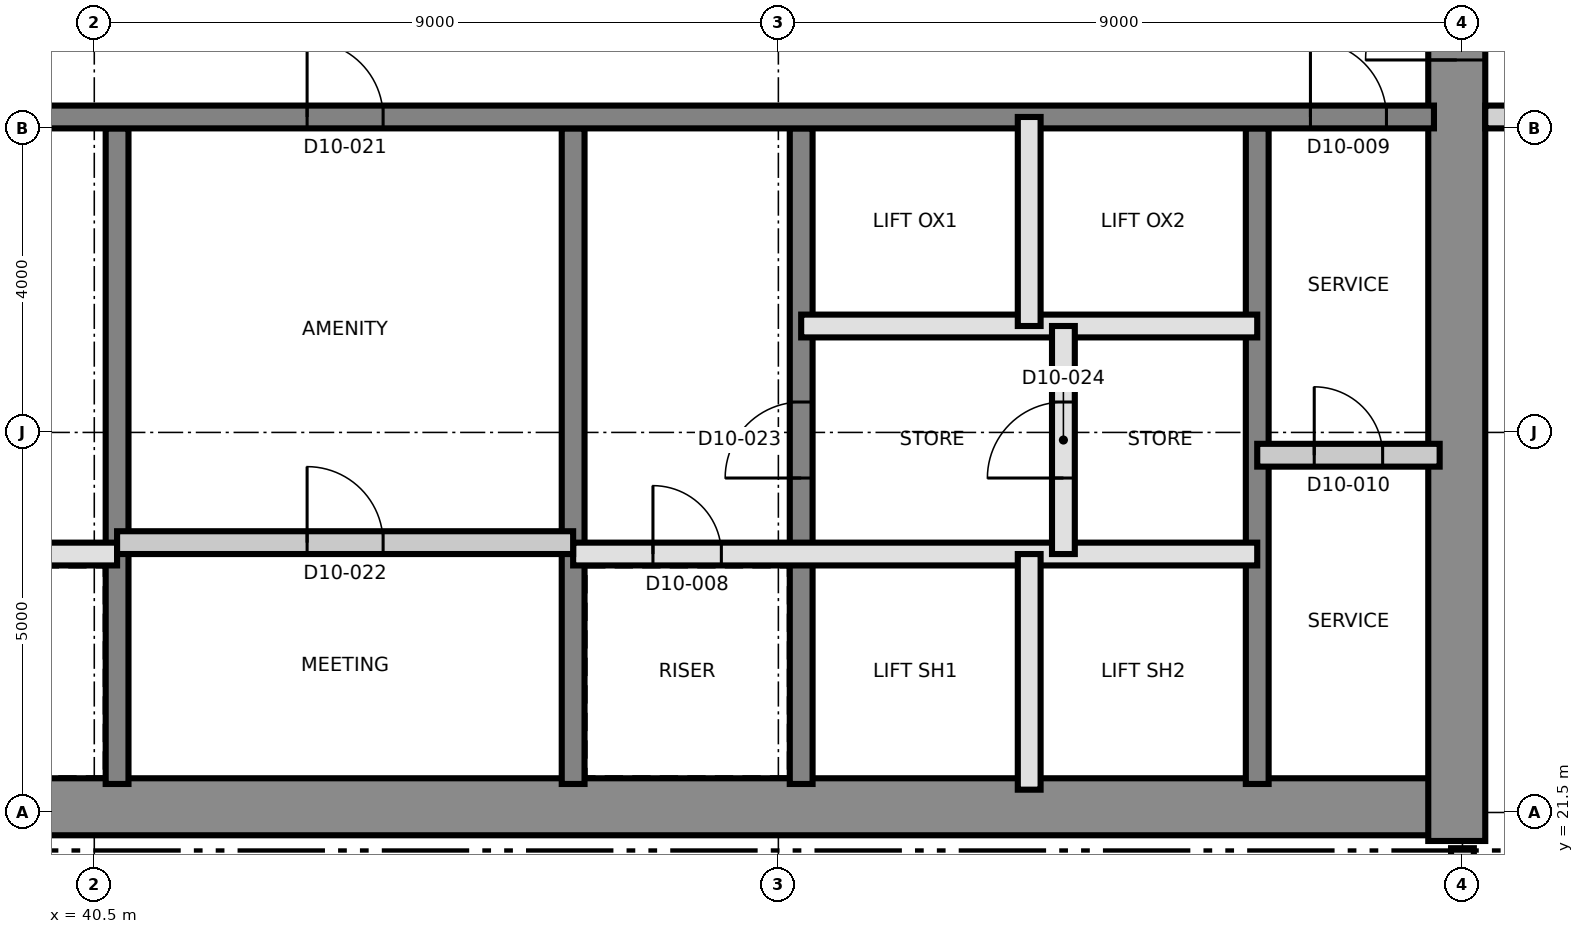
"""IFC4 building model, lengths in metres.
Left out: names, types, materials, properties, quantities, classifications, styles, units other than length and angle.
Written with IfcOpenShell. Run it as: python <this file> out.ifc"""

import sys

from ifc_helpers import new_model, si_unit, direction, frame, frame_2d, origin, place, context, subcontext, project, spatial, rectangle, extrude, element, fill, save


model = new_model("IFC4")
c1 = context("Model", 3, precision=1e-05, world=origin(), true_north=direction((0.0, 1.0)))
c2 = subcontext(c1, "Body", "Model", "MODEL_VIEW")
j1 = project(units=[si_unit("LENGTHUNIT", "METRE"), si_unit("PLANEANGLEUNIT", "RADIAN")], contexts=[c1])
p1 = place(None, origin())
s1 = spatial("IfcSite", under=j1, at=p1, CompositionType="ELEMENT")
p2 = place(p1, origin())
s2 = spatial("IfcBuilding", under=s1, at=p2, CompositionType="ELEMENT")
p3 = place(p2, frame((0.0, 0.0, 120.4)))
s3 = spatial("IfcBuildingStorey", under=s2, at=p3, CompositionType="ELEMENT", Elevation=120.4)
p4 = place(p3, frame((31.125, 21.575, 0.0), z_axis=(0.0, 0.0, 1.0), x_axis=(1.0, 0.0, 0.0)))
e1 = element("IfcWall", 1, at=p4, inside=s3, PredefinedType="SHEAR", context=c2, shape_type="SweptSolid", body=[
    extrude(rectangle(XDim=27.0, YDim=0.75, at=frame_2d((13.5, 0.0))), origin(), (0.0, 0.0, 1.0), 3.7),
])
p5 = place(p3, frame((58.425, 21.125, 0.0), z_axis=(0.0, 0.0, 1.0), x_axis=(0.0, 1.0, 0.0)))
e2 = element("IfcWall", 2, at=p5, inside=s3, PredefinedType="SHEAR", context=c2, shape_type="SweptSolid", body=[
    extrude(rectangle(XDim=18.75, YDim=0.75, at=frame_2d((9.375, 0.0))), origin(), (0.0, 0.0, 1.0), 3.7),
])
p6 = place(p5, frame((10.275, 0.0, 0.0)))
e3 = element("IfcOpeningElement", 3, at=p6, cuts=e2, PredefinedType="OPENING", context=c2, shape_type="SweptSolid", body=[
    extrude(rectangle(XDim=1.2, YDim=2.1, at=frame_2d((0.6, 1.05))), frame((0.0, 0.385, 0.0), z_axis=(0.0, -1.0, 0.0), x_axis=(1.0, 0.0, 0.0)), (0.0, 0.0, 1.0), 0.77),
])
for number, where, z_axis, x_axis in (
    (4, (40.8, 21.875, 0.0), (0.0, 0.0, 1.0), (0.0, 1.0, 0.0)),
    (5, (46.8, 21.875, 0.0), (0.0, 0.0, 1.0), (0.0, 1.0, 0.0)),
):
    element("IfcWall", number, at=place(p3, frame(where, z_axis=z_axis, x_axis=x_axis)), inside=s3, PredefinedType="SHEAR", context=c2, shape_type="SweptSolid", body=[
        extrude(rectangle(XDim=8.625, YDim=0.3, at=frame_2d((4.312, 0.0))), origin(), (0.0, 0.0, 1.0), 3.7),
    ])
p7 = place(p3, frame((49.8, 21.875, 0.0), z_axis=(0.0, 0.0, 1.0), x_axis=(0.0, 1.0, 0.0)))
e6 = element("IfcWall", 6, at=p7, inside=s3, PredefinedType="SHEAR", context=c2, shape_type="SweptSolid", body=[
    extrude(rectangle(XDim=8.625, YDim=0.3, at=frame_2d((4.312, 0.0))), origin(), (0.0, 0.0, 1.0), 3.7),
])
p8 = place(p7, frame((4.025, 0.0, 0.0)))
e7 = element("IfcOpeningElement", 7, at=p8, cuts=e6, PredefinedType="OPENING", context=c2, shape_type="SweptSolid", body=[
    extrude(rectangle(XDim=1.0, YDim=2.1, at=frame_2d((0.5, 1.05))), frame((0.0, 0.16, 0.0), z_axis=(0.0, -1.0, 0.0), x_axis=(1.0, 0.0, 0.0)), (0.0, 0.0, 1.0), 0.32),
])
p9 = place(p3, frame((55.8, 21.875, 0.0), z_axis=(0.0, 0.0, 1.0), x_axis=(0.0, 1.0, 0.0)))
e8 = element("IfcWall", 8, at=p9, inside=s3, PredefinedType="SHEAR", context=c2, shape_type="SweptSolid", body=[
    extrude(rectangle(XDim=8.625, YDim=0.3, at=frame_2d((4.312, 0.0))), origin(), (0.0, 0.0, 1.0), 3.7),
])
p10 = place(p3, frame((31.875, 30.65, 0.0), z_axis=(0.0, 0.0, 1.0), x_axis=(1.0, 0.0, 0.0)))
e9 = element("IfcWall", 9, at=p10, inside=s3, PredefinedType="SHEAR", context=c2, shape_type="SweptSolid", body=[
    extrude(rectangle(XDim=26.25, YDim=0.3, at=frame_2d((13.125, 0.0))), origin(), (0.0, 0.0, 1.0), 3.7),
])
p11 = place(p10, frame((24.625, 0.0, 0.0)))
e10 = element("IfcOpeningElement", 10, at=p11, cuts=e9, PredefinedType="OPENING", context=c2, shape_type="SweptSolid", body=[
    extrude(rectangle(XDim=1.0, YDim=2.1, at=frame_2d((0.5, 1.05))), frame((0.0, 0.16, 0.0), z_axis=(0.0, -1.0, 0.0), x_axis=(1.0, 0.0, 0.0)), (0.0, 0.0, 1.0), 0.32),
])
p12 = place(p10, frame((11.425, 0.0, 0.0)))
e11 = element("IfcOpeningElement", 11, at=p12, cuts=e9, PredefinedType="OPENING", context=c2, shape_type="SweptSolid", body=[
    extrude(rectangle(XDim=1.0, YDim=2.1, at=frame_2d((0.5, 1.05))), frame((0.0, 0.16, 0.0), z_axis=(0.0, -1.0, 0.0), x_axis=(1.0, 0.0, 0.0)), (0.0, 0.0, 1.0), 0.32),
])
p13 = place(p3, frame((31.8, 24.9, 0.0), z_axis=(0.0, 0.0, 1.0), x_axis=(1.0, 0.0, 0.0)))
e12 = element("IfcWall", 12, at=p13, inside=s3, PredefinedType="SOLIDWALL", context=c2, shape_type="SweptSolid", body=[
    extrude(rectangle(XDim=9.0, YDim=0.3, at=frame_2d((4.5, 0.0))), origin(), (0.0, 0.0, 1.0), 3.4),
])
p14 = place(p13, frame((7.05, 0.0, 0.0)))
e13 = element("IfcOpeningElement", 13, at=p14, cuts=e12, PredefinedType="OPENING", context=c2, shape_type="SweptSolid", body=[
    extrude(rectangle(XDim=0.9, YDim=2.1, at=frame_2d((0.45, 1.05))), frame((0.0, 0.16, 0.0), z_axis=(0.0, -1.0, 0.0), x_axis=(1.0, 0.0, 0.0)), (0.0, 0.0, 1.0), 0.32),
])
p15 = place(p13, frame((0.95, 0.0, 0.0)))
e14 = element("IfcOpeningElement", 14, at=p15, cuts=e12, PredefinedType="OPENING", context=c2, shape_type="SweptSolid", body=[
    extrude(rectangle(XDim=1.1, YDim=2.4, at=frame_2d((0.55, 1.2))), frame((0.0, 0.16, 0.0), z_axis=(0.0, -1.0, 0.0), x_axis=(1.0, 0.0, 0.0)), (0.0, 0.0, 1.0), 0.32),
])
p16 = place(p13, frame((3.95, 0.0, 0.0)))
e15 = element("IfcOpeningElement", 15, at=p16, cuts=e12, PredefinedType="OPENING", context=c2, shape_type="SweptSolid", body=[
    extrude(rectangle(XDim=1.1, YDim=2.4, at=frame_2d((0.55, 1.2))), frame((0.0, 0.16, 0.0), z_axis=(0.0, -1.0, 0.0), x_axis=(1.0, 0.0, 0.0)), (0.0, 0.0, 1.0), 0.32),
])
p17 = place(p3, frame((46.8, 24.9, 0.0), z_axis=(0.0, 0.0, 1.0), x_axis=(1.0, 0.0, 0.0)))
e16 = element("IfcWall", 16, at=p17, inside=s3, PredefinedType="SOLIDWALL", context=c2, shape_type="SweptSolid", body=[
    extrude(rectangle(XDim=9.0, YDim=0.3, at=frame_2d((4.5, 0.0))), origin(), (0.0, 0.0, 1.0), 3.4),
])
p18 = place(p17, frame((1.05, 0.0, 0.0)))
e17 = element("IfcOpeningElement", 17, at=p18, cuts=e16, PredefinedType="OPENING", context=c2, shape_type="SweptSolid", body=[
    extrude(rectangle(XDim=0.9, YDim=2.1, at=frame_2d((0.45, 1.05))), frame((0.0, 0.16, 0.0), z_axis=(0.0, -1.0, 0.0), x_axis=(1.0, 0.0, 0.0)), (0.0, 0.0, 1.0), 0.32),
])
p19 = place(p3, frame((40.8, 25.05, 0.0), z_axis=(0.0, 0.0, 1.0), x_axis=(1.0, 0.0, 0.0)))
e18 = element("IfcWall", 18, at=p19, inside=s3, PredefinedType="PARTITIONING", context=c2, shape_type="SweptSolid", body=[
    extrude(rectangle(XDim=6.0, YDim=0.3, at=frame_2d((3.0, 0.0))), origin(), (0.0, 0.0, 1.0), 3.4),
])
p20 = place(p19, frame((2.5, 0.0, 0.0)))
e19 = element("IfcOpeningElement", 19, at=p20, cuts=e18, PredefinedType="OPENING", context=c2, shape_type="SweptSolid", body=[
    extrude(rectangle(XDim=1.0, YDim=2.1, at=frame_2d((0.5, 1.05))), frame((0.0, 0.16, 0.0), z_axis=(0.0, -1.0, 0.0), x_axis=(1.0, 0.0, 0.0)), (0.0, 0.0, 1.0), 0.32),
])
p21 = place(p3, frame((55.8, 26.2, 0.0), z_axis=(0.0, 0.0, 1.0), x_axis=(1.0, 0.0, 0.0)))
e20 = element("IfcWall", 20, at=p21, inside=s3, PredefinedType="PARTITIONING", context=c2, shape_type="SweptSolid", body=[
    extrude(rectangle(XDim=2.4, YDim=0.3, at=frame_2d((1.2, 0.0))), origin(), (0.0, 0.0, 1.0), 3.4),
])
p22 = place(p21, frame((0.75, 0.0, 0.0)))
e21 = element("IfcOpeningElement", 21, at=p22, cuts=e20, PredefinedType="OPENING", context=c2, shape_type="SweptSolid", body=[
    extrude(rectangle(XDim=0.9, YDim=2.1, at=frame_2d((0.45, 1.05))), frame((0.0, 0.16, 0.0), z_axis=(0.0, -1.0, 0.0), x_axis=(1.0, 0.0, 0.0)), (0.0, 0.0, 1.0), 0.32),
])
p23 = place(p3, frame((49.8, 27.9, 0.0), z_axis=(0.0, 0.0, 1.0), x_axis=(1.0, 0.0, 0.0)))
e22 = element("IfcWall", 22, at=p23, inside=s3, PredefinedType="SOLIDWALL", context=c2, shape_type="SweptSolid", body=[
    extrude(rectangle(XDim=6.0, YDim=0.3, at=frame_2d((3.0, 0.0))), origin(), (0.0, 0.0, 1.0), 3.4),
])
p24 = place(p3, frame((52.8, 21.8, 0.0), z_axis=(0.0, 0.0, 1.0), x_axis=(0.0, 1.0, 0.0)))
e23 = element("IfcWall", 23, at=p24, inside=s3, PredefinedType="SOLIDWALL", context=c2, shape_type="SweptSolid", body=[
    extrude(rectangle(XDim=3.1, YDim=0.3, at=frame_2d((1.55, 0.0))), origin(), (0.0, 0.0, 1.0), 3.4),
])
p25 = place(p3, frame((52.8, 27.9, 0.0), z_axis=(0.0, 0.0, 1.0), x_axis=(0.0, 1.0, 0.0)))
e24 = element("IfcWall", 24, at=p25, inside=s3, PredefinedType="SOLIDWALL", context=c2, shape_type="SweptSolid", body=[
    extrude(rectangle(XDim=2.75, YDim=0.3, at=frame_2d((1.375, 0.0))), origin(), (0.0, 0.0, 1.0), 3.4),
])
p26 = place(p3, frame((53.25, 24.9, 0.0), z_axis=(0.0, 0.0, 1.0), x_axis=(0.0, 1.0, 0.0)))
e25 = element("IfcWall", 25, at=p26, inside=s3, PredefinedType="SOLIDWALL", context=c2, shape_type="SweptSolid", body=[
    extrude(rectangle(XDim=3.0, YDim=0.3, at=frame_2d((1.5, 0.0))), origin(), (0.0, 0.0, 1.0), 3.4),
])
p27 = place(p26, frame((1.0, 0.0, 0.0)))
e26 = element("IfcOpeningElement", 26, at=p27, cuts=e25, PredefinedType="OPENING", context=c2, shape_type="SweptSolid", body=[
    extrude(rectangle(XDim=1.0, YDim=2.1, at=frame_2d((0.5, 1.05))), frame((0.0, 0.16, 0.0), z_axis=(0.0, -1.0, 0.0), x_axis=(1.0, 0.0, 0.0)), (0.0, 0.0, 1.0), 0.32),
])
p28 = place(p3, frame((58.8, 30.65, 0.0), z_axis=(0.0, 0.0, 1.0), x_axis=(1.0, 0.0, 0.0)))
e27 = element("IfcWall", 27, at=p28, inside=s3, PredefinedType="PARTITIONING", context=c2, shape_type="SweptSolid", body=[
    extrude(rectangle(XDim=26.53, YDim=0.3, at=frame_2d((13.265, 0.0))), origin(), (0.0, 0.0, 1.0), 3.4),
])
p29 = place(p28, frame((0.835, 0.0, 0.0)))
e28 = element("IfcOpeningElement", 28, at=p29, cuts=e27, PredefinedType="OPENING", context=c2, shape_type="SweptSolid", body=[
    extrude(rectangle(XDim=1.2, YDim=2.1, at=frame_2d((0.6, 1.05))), frame((0.0, 0.16, 0.0), z_axis=(0.0, -1.0, 0.0), x_axis=(1.0, 0.0, 0.0)), (0.0, 0.0, 1.0), 0.32),
])
p30 = place(p28, frame((4.085, 0.0, 0.0)))
e29 = element("IfcOpeningElement", 29, at=p30, cuts=e27, PredefinedType="OPENING", context=c2, shape_type="SweptSolid", body=[
    extrude(rectangle(XDim=1.0, YDim=2.1, at=frame_2d((0.5, 1.05))), frame((0.0, 0.16, 0.0), z_axis=(0.0, -1.0, 0.0), x_axis=(1.0, 0.0, 0.0)), (0.0, 0.0, 1.0), 0.32),
])
p31 = place(p28, frame((12.7, 0.0, 0.0)))
e30 = element("IfcOpeningElement", 30, at=p31, cuts=e27, PredefinedType="OPENING", context=c2, shape_type="SweptSolid", body=[
    extrude(rectangle(XDim=1.0, YDim=2.4, at=frame_2d((0.5, 1.2))), frame((0.0, 0.16, 0.0), z_axis=(0.0, -1.0, 0.0), x_axis=(1.0, 0.0, 0.0)), (0.0, 0.0, 1.0), 0.32),
])
p32 = place(p28, frame((21.7, 0.0, 0.0)))
e31 = element("IfcOpeningElement", 31, at=p32, cuts=e27, PredefinedType="OPENING", context=c2, shape_type="SweptSolid", body=[
    extrude(rectangle(XDim=1.0, YDim=2.4, at=frame_2d((0.5, 1.2))), frame((0.0, 0.16, 0.0), z_axis=(0.0, -1.0, 0.0), x_axis=(1.0, 0.0, 0.0)), (0.0, 0.0, 1.0), 0.32),
])
p33 = place(p3, frame((58.5, 19.275, 0.0), z_axis=(0.0, 0.0, 1.0), x_axis=(0.0, 1.0, 0.0)))
e32 = element("IfcWall", 32, at=p33, inside=s3, PredefinedType="PARTITIONING", context=c2, shape_type="SweptSolid", body=[
    extrude(rectangle(XDim=1.755, YDim=0.3, at=frame_2d((0.877, 0.0))), origin(), (0.0, 0.0, 1.0), 3.35),
])
p34 = place(p18, origin())
e33 = element("IfcDoor", 33, at=p34, inside=s3, OperationType="SINGLE_SWING_RIGHT", PredefinedType="DOOR", context=c2, shape_type="SweptSolid", body=[
    extrude(rectangle(XDim=0.9, YDim=2.1, at=frame_2d((0.45, 1.05))), frame((0.0, 0.025, 0.0), z_axis=(0.0, -1.0, 0.0), x_axis=(1.0, 0.0, 0.0)), (0.0, 0.0, 1.0), 0.05),
])
fill(e17, e33)
p35 = place(p11, origin())
e34 = element("IfcDoor", 34, at=p35, inside=s3, OperationType="SINGLE_SWING_LEFT", PredefinedType="DOOR", context=c2, shape_type="SweptSolid", body=[
    extrude(rectangle(XDim=1.0, YDim=2.1, at=frame_2d((0.5, 1.05))), frame((0.0, 0.025, 0.0), z_axis=(0.0, -1.0, 0.0), x_axis=(1.0, 0.0, 0.0)), (0.0, 0.0, 1.0), 0.05),
])
fill(e10, e34)
p36 = place(p22, origin())
e35 = element("IfcDoor", 35, at=p36, inside=s3, OperationType="SINGLE_SWING_RIGHT", PredefinedType="DOOR", context=c2, shape_type="SweptSolid", body=[
    extrude(rectangle(XDim=0.9, YDim=2.1, at=frame_2d((0.45, 1.05))), frame((0.0, 0.025, 0.0), z_axis=(0.0, -1.0, 0.0), x_axis=(1.0, 0.0, 0.0)), (0.0, 0.0, 1.0), 0.05),
])
fill(e21, e35)
p37 = place(p6, origin())
e36 = element("IfcDoor", 36, at=p37, inside=s3, OperationType="SINGLE_SWING_LEFT", PredefinedType="DOOR", context=c2, shape_type="SweptSolid", body=[
    extrude(rectangle(XDim=1.2, YDim=2.1, at=frame_2d((0.6, 1.05))), frame((0.0, 0.025, 0.0), z_axis=(0.0, -1.0, 0.0), x_axis=(1.0, 0.0, 0.0)), (0.0, 0.0, 1.0), 0.05),
])
fill(e3, e36)
p38 = place(p12, origin())
e37 = element("IfcDoor", 37, at=p38, inside=s3, OperationType="SINGLE_SWING_LEFT", PredefinedType="DOOR", context=c2, shape_type="SweptSolid", body=[
    extrude(rectangle(XDim=1.0, YDim=2.1, at=frame_2d((0.5, 1.05))), frame((0.0, 0.025, 0.0), z_axis=(0.0, -1.0, 0.0), x_axis=(1.0, 0.0, 0.0)), (0.0, 0.0, 1.0), 0.05),
])
fill(e11, e37)
p39 = place(p20, origin())
e38 = element("IfcDoor", 38, at=p39, inside=s3, OperationType="SINGLE_SWING_RIGHT", PredefinedType="DOOR", context=c2, shape_type="SweptSolid", body=[
    extrude(rectangle(XDim=1.0, YDim=2.1, at=frame_2d((0.5, 1.05))), frame((0.0, 0.025, 0.0), z_axis=(0.0, -1.0, 0.0), x_axis=(1.0, 0.0, 0.0)), (0.0, 0.0, 1.0), 0.05),
])
fill(e19, e38)
p40 = place(p8, origin())
e39 = element("IfcDoor", 39, at=p40, inside=s3, OperationType="SINGLE_SWING_LEFT", PredefinedType="DOOR", context=c2, shape_type="SweptSolid", body=[
    extrude(rectangle(XDim=1.0, YDim=2.1, at=frame_2d((0.5, 1.05))), frame((0.0, 0.025, 0.0), z_axis=(0.0, -1.0, 0.0), x_axis=(1.0, 0.0, 0.0)), (0.0, 0.0, 1.0), 0.05),
])
fill(e7, e39)
p41 = place(p27, origin())
e40 = element("IfcDoor", 40, at=p41, inside=s3, OperationType="SINGLE_SWING_RIGHT", PredefinedType="DOOR", context=c2, shape_type="SweptSolid", body=[
    extrude(rectangle(XDim=1.0, YDim=2.1, at=frame_2d((0.5, 1.05))), frame((0.0, 0.025, 0.0), z_axis=(0.0, -1.0, 0.0), x_axis=(1.0, 0.0, 0.0)), (0.0, 0.0, 1.0), 0.05),
])
fill(e26, e40)
save(model, sys.argv[1])
